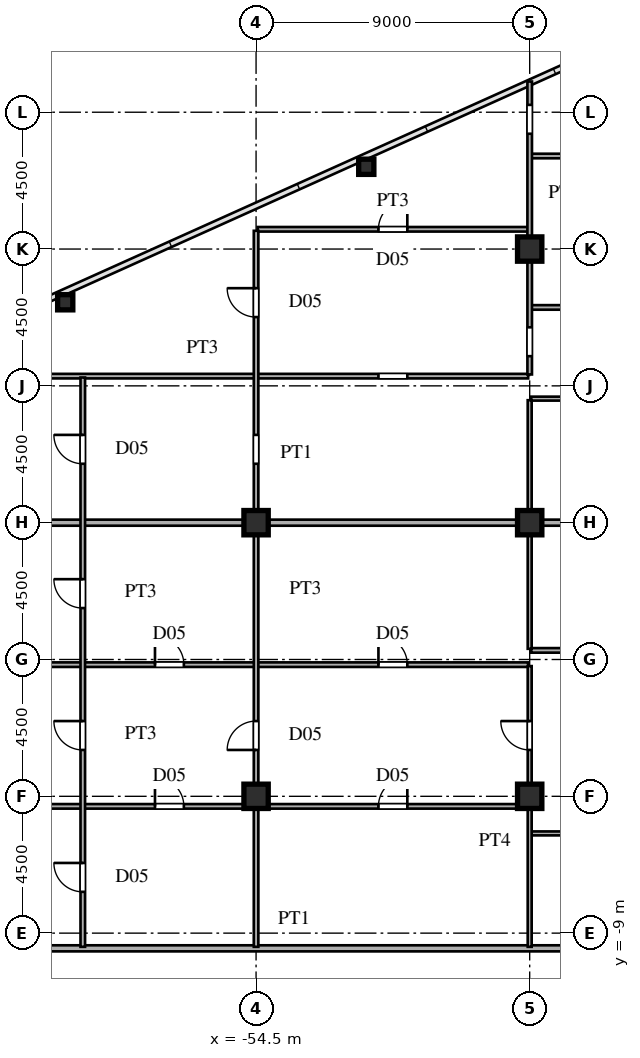
"""IFC4 building model, lengths in metres.
Left out: names, types, materials, properties, quantities, classifications, styles, units other than length and angle.
Written with IfcOpenShell. Run it as: python <this file> out.ifc"""

import sys

from ifc_helpers import new_model, si_unit, direction, frame, frame_2d, origin, origin_2d, place, context, subcontext, project, spatial, rectangle, hollow_rectangle, i_section, extrude, source, transform, mapped, element, fill, save


model = new_model("IFC4")
c1 = context("Model", 3, precision=1e-05, world=origin(), true_north=direction((0.0, 1.0)))
c2 = subcontext(c1, "Body", "Model", "MODEL_VIEW")
j1 = project(units=[si_unit("LENGTHUNIT", "METRE"), si_unit("PLANEANGLEUNIT", "RADIAN")], contexts=[c1])
p1 = place(None, origin())
s1 = spatial("IfcSite", under=j1, at=p1, CompositionType="ELEMENT")
p2 = place(p1, origin())
s2 = spatial("IfcBuilding", under=s1, at=p2, CompositionType="ELEMENT")
p3 = place(p2, frame((0.0, 0.0, 80.1)))
s3 = spatial("IfcBuildingStorey", under=s2, at=p3, CompositionType="ELEMENT", Elevation=80.1)
m1 = source(origin(), c2, "Body", "SweptSolid", [
    extrude(i_section(OverallWidth=0.8, OverallDepth=0.8, WebThickness=0.032, FlangeThickness=0.05, at=origin_2d()), origin(), (0.0, 0.0, 1.0), 3.6),
])
for number, where, z_axis, x_axis in (
    (1, (-45.5, -4.5, 0.0), (0.0, 0.0, 1.0), (1.0, 0.0, 0.0)),
    (2, (-45.5, 4.5, 0.0), (0.0, 0.0, 1.0), (1.0, 0.0, 0.0)),
    (3, (-45.5, 13.5, 0.0), (0.0, 0.0, 1.0), (1.0, 0.0, 0.0)),
    (4, (-54.5, -4.5, 0.0), (0.0, 0.0, 1.0), (1.0, 0.0, 0.0)),
    (5, (-54.5, 4.5, 0.0), (0.0, 0.0, 1.0), (1.0, 0.0, 0.0)),
):
    element("IfcColumn", number, at=place(p3, frame(where, z_axis=z_axis, x_axis=x_axis)), inside=s3, PredefinedType="COLUMN", context=c2, shape_type="MappedRepresentation", body=[
        mapped(m1, transform((0.0, 0.0, 0.0), scale=1.0)),
    ])
m2 = source(origin(), c2, "Body", "SweptSolid", [
    extrude(hollow_rectangle(XDim=0.5, YDim=0.5, WallThickness=0.02, at=origin_2d()), origin(), (0.0, 0.0, 1.0), 3.6),
])
for number, where, z_axis, x_axis in (
    (6, (-50.875, 16.205, 0.0), (0.0, 0.0, 1.0), (1.0, 0.0, 0.0)),
    (7, (-60.778, 11.749, 0.0), (0.0, 0.0, 1.0), (1.0, 0.0, 0.0)),
):
    element("IfcColumn", number, at=place(p3, frame(where, z_axis=z_axis, x_axis=x_axis)), inside=s3, PredefinedType="COLUMN", context=c2, shape_type="MappedRepresentation", body=[
        mapped(m2, transform((0.0, 0.0, 0.0), scale=1.0)),
    ])
p4 = place(p3, frame((-66.568, -9.5, 0.0), z_axis=(0.0, 0.0, 1.0), x_axis=(1.0, 0.0, 0.0)))
e8 = element("IfcWall", 8, at=p4, inside=s3, PredefinedType="PARTITIONING", context=c2, shape_type="SweptSolid", body=[
    extrude(rectangle(XDim=26.638, YDim=0.2, at=frame_2d((13.319, 0.0))), origin(), (0.0, 0.0, 1.0), 3.38),
])
p5 = place(p3, frame((-45.45, -5.72, 0.0), z_axis=(0.0, 0.0, 1.0), x_axis=(1.0, 0.0, 0.0)))
e9 = element("IfcWall", 9, at=p5, inside=s3, PredefinedType="PARTITIONING", context=c2, shape_type="SweptSolid", body=[
    extrude(rectangle(XDim=5.55, YDim=0.13, at=frame_2d((2.775, 0.0))), origin(), (0.0, 0.0, 1.0), 3.38),
])
p6 = place(p5, frame((2.335, 0.0, 0.0)))
e10 = element("IfcOpeningElement", 10, at=p6, cuts=e9, PredefinedType="OPENING", context=c2, shape_type="SweptSolid", body=[
    extrude(rectangle(XDim=0.88, YDim=2.1, at=frame_2d((0.44, 1.05))), frame((0.0, 0.075, 0.0), z_axis=(0.0, -1.0, 0.0), x_axis=(1.0, 0.0, 0.0)), (0.0, 0.0, 1.0), 0.15),
])
p7 = place(p3, frame((-71.035, -4.83, 0.0), z_axis=(0.0, 0.0, 1.0), x_axis=(1.0, 0.0, 0.0)))
e11 = element("IfcWall", 11, at=p7, inside=s3, PredefinedType="PARTITIONING", context=c2, shape_type="SweptSolid", body=[
    extrude(rectangle(XDim=25.485, YDim=0.15, at=frame_2d((12.742, 0.0))), origin(), (0.0, 0.0, 1.0), 3.38),
])
p8 = place(p7, frame((20.56, 0.0, 0.0)))
e12 = element("IfcOpeningElement", 12, at=p8, cuts=e11, PredefinedType="OPENING", context=c2, shape_type="SweptSolid", body=[
    extrude(rectangle(XDim=0.95, YDim=2.15, at=frame_2d((0.475, 1.075))), frame((0.0, 0.085, 0.0), z_axis=(0.0, -1.0, 0.0), x_axis=(1.0, 0.0, 0.0)), (0.0, 0.0, 1.0), 0.17),
])
p9 = place(p7, frame((13.21, 0.0, 0.0)))
e13 = element("IfcOpeningElement", 13, at=p9, cuts=e11, PredefinedType="OPENING", context=c2, shape_type="SweptSolid", body=[
    extrude(rectangle(XDim=0.95, YDim=2.15, at=frame_2d((0.475, 1.075))), frame((0.0, 0.085, 0.0), z_axis=(0.0, -1.0, 0.0), x_axis=(1.0, 0.0, 0.0)), (0.0, 0.0, 1.0), 0.17),
])
p10 = place(p3, frame((-71.035, -0.17, 0.0), z_axis=(0.0, 0.0, 1.0), x_axis=(1.0, 0.0, 0.0)))
e14 = element("IfcWall", 14, at=p10, inside=s3, PredefinedType="PARTITIONING", context=c2, shape_type="SweptSolid", body=[
    extrude(rectangle(XDim=25.485, YDim=0.15, at=frame_2d((12.742, 0.0))), origin(), (0.0, 0.0, 1.0), 3.38),
])
p11 = place(p10, frame((20.56, 0.0, 0.0)))
e15 = element("IfcOpeningElement", 15, at=p11, cuts=e14, PredefinedType="OPENING", context=c2, shape_type="SweptSolid", body=[
    extrude(rectangle(XDim=0.95, YDim=2.15, at=frame_2d((0.475, 1.075))), frame((0.0, 0.085, 0.0), z_axis=(0.0, -1.0, 0.0), x_axis=(1.0, 0.0, 0.0)), (0.0, 0.0, 1.0), 0.17),
])
p12 = place(p10, frame((13.21, 0.0, 0.0)))
e16 = element("IfcOpeningElement", 16, at=p12, cuts=e14, PredefinedType="OPENING", context=c2, shape_type="SweptSolid", body=[
    extrude(rectangle(XDim=0.95, YDim=2.15, at=frame_2d((0.475, 1.075))), frame((0.0, 0.085, 0.0), z_axis=(0.0, -1.0, 0.0), x_axis=(1.0, 0.0, 0.0)), (0.0, 0.0, 1.0), 0.17),
])
p13 = place(p3, frame((-45.45, 0.3, 0.0), z_axis=(0.0, 0.0, 1.0), x_axis=(1.0, 0.0, 0.0)))
e17 = element("IfcWall", 17, at=p13, inside=s3, PredefinedType="PARTITIONING", context=c2, shape_type="SweptSolid", body=[
    extrude(rectangle(XDim=5.55, YDim=0.15, at=frame_2d((2.775, 0.0))), origin(), (0.0, 0.0, 1.0), 3.38),
])
p14 = place(p13, frame((2.3, 0.0, 0.0)))
e18 = element("IfcOpeningElement", 18, at=p14, cuts=e17, PredefinedType="OPENING", context=c2, shape_type="SweptSolid", body=[
    extrude(rectangle(XDim=0.95, YDim=2.15, at=frame_2d((0.475, 1.075))), frame((0.0, 0.085, 0.0), z_axis=(0.0, -1.0, 0.0), x_axis=(1.0, 0.0, 0.0)), (0.0, 0.0, 1.0), 0.17),
])
p15 = place(p3, frame((-71.005, 4.5, 0.0), z_axis=(0.0, 0.0, 1.0), x_axis=(1.0, 0.0, 0.0)))
e19 = element("IfcWall", 19, at=p15, inside=s3, PredefinedType="PARTITIONING", context=c2, shape_type="SweptSolid", body=[
    extrude(rectangle(XDim=16.485, YDim=0.2, at=frame_2d((8.242, 0.0))), origin(), (0.0, 0.0, 1.0), 3.38),
])
p16 = place(p3, frame((-54.52, 4.5, 0.0), z_axis=(0.0, 0.0, 1.0), x_axis=(1.0, 0.0, 0.0)))
e20 = element("IfcWall", 20, at=p16, inside=s3, PredefinedType="PARTITIONING", context=c2, shape_type="SweptSolid", body=[
    extrude(rectangle(XDim=14.59, YDim=0.2, at=frame_2d((7.295, 0.0))), origin(), (0.0, 0.0, 1.0), 2.68),
])
p17 = place(p3, frame((-45.45, 8.58, 0.0), z_axis=(0.0, 0.0, 1.0), x_axis=(1.0, 0.0, 0.0)))
e21 = element("IfcWall", 21, at=p17, inside=s3, PredefinedType="PARTITIONING", context=c2, shape_type="SweptSolid", body=[
    extrude(rectangle(XDim=5.55, YDim=0.13, at=frame_2d((2.775, 0.0))), origin(), (0.0, 0.0, 1.0), 3.38),
])
p18 = place(p17, frame((2.335, 0.0, 0.0)))
e22 = element("IfcOpeningElement", 22, at=p18, cuts=e21, PredefinedType="OPENING", context=c2, shape_type="SweptSolid", body=[
    extrude(rectangle(XDim=0.88, YDim=2.1, at=frame_2d((0.44, 1.05))), frame((0.0, 0.075, 0.0), z_axis=(0.0, -1.0, 0.0), x_axis=(1.0, 0.0, 0.0)), (0.0, 0.0, 1.0), 0.15),
])
p19 = place(p3, frame((-66.979, 9.32, 0.0), z_axis=(0.0, 0.0, 1.0), x_axis=(1.0, 0.0, 0.0)))
e23 = element("IfcWall", 23, at=p19, inside=s3, PredefinedType="PARTITIONING", context=c2, shape_type="SweptSolid", body=[
    extrude(rectangle(XDim=21.429, YDim=0.15, at=frame_2d((10.714, 0.0))), origin(), (0.0, 0.0, 1.0), 3.38),
])
p20 = place(p19, frame((16.504, 0.0, 0.0)))
e24 = element("IfcOpeningElement", 24, at=p20, cuts=e23, PredefinedType="OPENING", context=c2, shape_type="SweptSolid", body=[
    extrude(rectangle(XDim=0.95, YDim=2.15, at=frame_2d((0.475, 1.075))), frame((0.0, 0.085, 0.0), z_axis=(0.0, -1.0, 0.0), x_axis=(1.0, 0.0, 0.0)), (0.0, 0.0, 1.0), 0.17),
])
p21 = place(p3, frame((-45.45, 11.58, 0.0), z_axis=(0.0, 0.0, 1.0), x_axis=(1.0, 0.0, 0.0)))
e25 = element("IfcWall", 25, at=p21, inside=s3, PredefinedType="PARTITIONING", context=c2, shape_type="SweptSolid", body=[
    extrude(rectangle(XDim=5.55, YDim=0.15, at=frame_2d((2.775, 0.0))), origin(), (0.0, 0.0, 1.0), 3.38),
])
p22 = place(p21, frame((2.3, 0.0, 0.0)))
e26 = element("IfcOpeningElement", 26, at=p22, cuts=e25, PredefinedType="OPENING", context=c2, shape_type="SweptSolid", body=[
    extrude(rectangle(XDim=0.95, YDim=2.15, at=frame_2d((0.475, 1.075))), frame((0.0, 0.085, 0.0), z_axis=(0.0, -1.0, 0.0), x_axis=(1.0, 0.0, 0.0)), (0.0, 0.0, 1.0), 0.17),
])
p23 = place(p3, frame((-54.45, 14.15, 0.0), z_axis=(0.0, 0.0, 1.0), x_axis=(1.0, 0.0, 0.0)))
e27 = element("IfcWall", 27, at=p23, inside=s3, PredefinedType="PARTITIONING", context=c2, shape_type="SweptSolid", body=[
    extrude(rectangle(XDim=8.9, YDim=0.15, at=frame_2d((4.45, 0.0))), origin(), (0.0, 0.0, 1.0), 3.38),
])
p24 = place(p23, frame((3.975, 0.0, 0.0)))
e28 = element("IfcOpeningElement", 28, at=p24, cuts=e27, PredefinedType="OPENING", context=c2, shape_type="SweptSolid", body=[
    extrude(rectangle(XDim=0.95, YDim=2.15, at=frame_2d((0.475, 1.075))), frame((0.0, 0.085, 0.0), z_axis=(0.0, -1.0, 0.0), x_axis=(1.0, 0.0, 0.0)), (0.0, 0.0, 1.0), 0.17),
])
p25 = place(p3, frame((-45.45, 16.56, 0.0), z_axis=(0.0, 0.0, 1.0), x_axis=(1.0, 0.0, 0.0)))
e29 = element("IfcWall", 29, at=p25, inside=s3, PredefinedType="PARTITIONING", context=c2, shape_type="SweptSolid", body=[
    extrude(rectangle(XDim=5.6, YDim=0.15, at=frame_2d((2.8, 0.0))), origin(), (0.0, 0.0, 1.0), 3.38),
])
p26 = place(p3, frame((-60.2, -9.45, 0.0), z_axis=(0.0, 0.0, 1.0), x_axis=(0.0, 1.0, 0.0)))
e30 = element("IfcWall", 30, at=p26, inside=s3, PredefinedType="PARTITIONING", context=c2, shape_type="SweptSolid", body=[
    extrude(rectangle(XDim=18.725, YDim=0.15, at=frame_2d((9.362, 0.0))), origin(), (0.0, 0.0, 1.0), 3.38),
])
p27 = place(p26, frame((1.808, 0.0, 0.0)))
e31 = element("IfcOpeningElement", 31, at=p27, cuts=e30, PredefinedType="OPENING", context=c2, shape_type="SweptSolid", body=[
    extrude(rectangle(XDim=0.95, YDim=2.15, at=frame_2d((0.475, 1.075))), frame((0.0, 0.085, 0.0), z_axis=(0.0, -1.0, 0.0), x_axis=(1.0, 0.0, 0.0)), (0.0, 0.0, 1.0), 0.17),
])
p28 = place(p26, frame((6.475, 0.0, 0.0)))
e32 = element("IfcOpeningElement", 32, at=p28, cuts=e30, PredefinedType="OPENING", context=c2, shape_type="SweptSolid", body=[
    extrude(rectangle(XDim=0.95, YDim=2.15, at=frame_2d((0.475, 1.075))), frame((0.0, 0.085, 0.0), z_axis=(0.0, -1.0, 0.0), x_axis=(1.0, 0.0, 0.0)), (0.0, 0.0, 1.0), 0.17),
])
p29 = place(p26, frame((11.142, 0.0, 0.0)))
e33 = element("IfcOpeningElement", 33, at=p29, cuts=e30, PredefinedType="OPENING", context=c2, shape_type="SweptSolid", body=[
    extrude(rectangle(XDim=0.95, YDim=2.15, at=frame_2d((0.475, 1.075))), frame((0.0, 0.085, 0.0), z_axis=(0.0, -1.0, 0.0), x_axis=(1.0, 0.0, 0.0)), (0.0, 0.0, 1.0), 0.17),
])
p30 = place(p26, frame((15.887, 0.0, 0.0)))
e34 = element("IfcOpeningElement", 34, at=p30, cuts=e30, PredefinedType="OPENING", context=c2, shape_type="SweptSolid", body=[
    extrude(rectangle(XDim=0.95, YDim=2.15, at=frame_2d((0.475, 1.075))), frame((0.0, 0.085, 0.0), z_axis=(0.0, -1.0, 0.0), x_axis=(1.0, 0.0, 0.0)), (0.0, 0.0, 1.0), 0.17),
])
p31 = place(p3, frame((-54.5, -9.45, 0.0), z_axis=(0.0, 0.0, 1.0), x_axis=(0.0, 1.0, 0.0)))
e35 = element("IfcWall", 35, at=p31, inside=s3, PredefinedType="PARTITIONING", context=c2, shape_type="SweptSolid", body=[
    extrude(rectangle(XDim=23.55, YDim=0.15, at=frame_2d((11.775, 0.0))), origin(), (0.0, 0.0, 1.0), 2.68),
])
p32 = place(p31, frame((6.475, 0.0, 0.0)))
e36 = element("IfcOpeningElement", 36, at=p32, cuts=e35, PredefinedType="OPENING", context=c2, shape_type="SweptSolid", body=[
    extrude(rectangle(XDim=0.95, YDim=2.15, at=frame_2d((0.475, 1.075))), frame((0.0, 0.085, 0.0), z_axis=(0.0, -1.0, 0.0), x_axis=(1.0, 0.0, 0.0)), (0.0, 0.0, 1.0), 0.17),
])
p33 = place(p31, frame((20.712, 0.0, 0.0)))
e37 = element("IfcOpeningElement", 37, at=p33, cuts=e35, PredefinedType="OPENING", context=c2, shape_type="SweptSolid", body=[
    extrude(rectangle(XDim=0.95, YDim=2.15, at=frame_2d((0.475, 1.075))), frame((0.0, 0.085, 0.0), z_axis=(0.0, -1.0, 0.0), x_axis=(1.0, 0.0, 0.0)), (0.0, 0.0, 1.0), 0.17),
])
p34 = place(p31, frame((15.887, 0.0, 0.0)))
e38 = element("IfcOpeningElement", 38, at=p34, cuts=e35, PredefinedType="OPENING", context=c2, shape_type="SweptSolid", body=[
    extrude(rectangle(XDim=0.95, YDim=2.15, at=frame_2d((0.475, 1.075))), frame((0.0, 0.085, 0.0), z_axis=(0.0, -1.0, 0.0), x_axis=(1.0, 0.0, 0.0)), (0.0, 0.0, 1.0), 0.17),
])
p35 = place(p3, frame((-45.5, -9.45, 0.0), z_axis=(0.0, 0.0, 1.0), x_axis=(0.0, 1.0, 0.0)))
e39 = element("IfcWall", 39, at=p35, inside=s3, PredefinedType="PARTITIONING", context=c2, shape_type="SweptSolid", body=[
    extrude(rectangle(XDim=9.233, YDim=0.13, at=frame_2d((4.616, 0.0))), origin(), (0.0, 0.0, 1.0), 2.68),
])
p36 = place(p35, frame((6.475, 0.0, 0.0)))
e40 = element("IfcOpeningElement", 40, at=p36, cuts=e39, PredefinedType="OPENING", context=c2, shape_type="SweptSolid", body=[
    extrude(rectangle(XDim=0.95, YDim=2.15, at=frame_2d((0.475, 1.075))), frame((0.0, 0.075, 0.0), z_axis=(0.0, -1.0, 0.0), x_axis=(1.0, 0.0, 0.0)), (0.0, 0.0, 1.0), 0.15),
])
p37 = place(p3, frame((-45.5, 0.352, 0.0), z_axis=(0.0, 0.0, 1.0), x_axis=(0.0, 1.0, 0.0)))
e41 = element("IfcWall", 41, at=p37, inside=s3, PredefinedType="PARTITIONING", context=c2, shape_type="SweptSolid", body=[
    extrude(rectangle(XDim=8.176, YDim=0.13, at=frame_2d((4.088, 0.0))), origin(), (0.0, 0.0, 1.0), 2.68),
])
p38 = place(p3, frame((-45.5, 9.375, 0.0), z_axis=(0.0, 0.0, 1.0), x_axis=(0.0, 1.0, 0.0)))
e42 = element("IfcWall", 42, at=p38, inside=s3, PredefinedType="PARTITIONING", context=c2, shape_type="SweptSolid", body=[
    extrude(rectangle(XDim=9.635, YDim=0.15, at=frame_2d((4.817, 0.0))), origin(), (0.0, 0.0, 1.0), 2.68),
])
p39 = place(p38, frame((0.601, 0.0, 0.0)))
e43 = element("IfcOpeningElement", 43, at=p39, cuts=e42, PredefinedType="OPENING", context=c2, shape_type="SweptSolid", body=[
    extrude(rectangle(XDim=0.95, YDim=2.15, at=frame_2d((0.475, 1.075))), frame((0.0, 0.085, 0.0), z_axis=(0.0, -1.0, 0.0), x_axis=(1.0, 0.0, 0.0)), (0.0, 0.0, 1.0), 0.17),
])
p40 = place(p38, frame((7.917, 0.0, 0.0)))
e44 = element("IfcOpeningElement", 44, at=p40, cuts=e42, PredefinedType="OPENING", context=c2, shape_type="SweptSolid", body=[
    extrude(rectangle(XDim=0.95, YDim=2.15, at=frame_2d((0.475, 1.075))), frame((0.0, 0.085, 0.0), z_axis=(0.0, -1.0, 0.0), x_axis=(1.0, 0.0, 0.0)), (0.0, 0.0, 1.0), 0.17),
])
m3 = source(origin(), c2, "Body", "SweptSolid", [
    extrude(rectangle(XDim=0.95, YDim=2.15, at=frame_2d((0.475, 1.075))), frame((0.0, 0.025, 0.0), z_axis=(0.0, -1.0, 0.0), x_axis=(1.0, 0.0, 0.0)), (0.0, 0.0, 1.0), 0.05),
])
p41 = place(p8, origin())
e45 = element("IfcDoor", 45, at=p41, inside=s3, OperationType="SINGLE_SWING_RIGHT", PredefinedType="DOOR", context=c2, shape_type="MappedRepresentation", body=[
    mapped(m3, transform((0.0, 0.0, 0.0), scale=1.0)),
])
fill(e12, e45)
p42 = place(p9, origin())
e46 = element("IfcDoor", 46, at=p42, inside=s3, OperationType="SINGLE_SWING_LEFT", PredefinedType="DOOR", context=c2, shape_type="MappedRepresentation", body=[
    mapped(m3, transform((0.0, 0.0, 0.0), scale=1.0)),
])
fill(e13, e46)
p43 = place(p11, origin())
e47 = element("IfcDoor", 47, at=p43, inside=s3, OperationType="SINGLE_SWING_LEFT", PredefinedType="DOOR", context=c2, shape_type="MappedRepresentation", body=[
    mapped(m3, transform((0.0, 0.0, 0.0), scale=1.0)),
])
fill(e15, e47)
p44 = place(p12, origin())
e48 = element("IfcDoor", 48, at=p44, inside=s3, OperationType="SINGLE_SWING_LEFT", PredefinedType="DOOR", context=c2, shape_type="MappedRepresentation", body=[
    mapped(m3, transform((0.0, 0.0, 0.0), scale=1.0)),
])
fill(e16, e48)
p45 = place(p24, origin())
e49 = element("IfcDoor", 49, at=p45, inside=s3, OperationType="SINGLE_SWING_RIGHT", PredefinedType="DOOR", context=c2, shape_type="MappedRepresentation", body=[
    mapped(m3, transform((0.0, 0.0, 0.0), scale=1.0)),
])
fill(e28, e49)
p46 = place(p27, origin())
e50 = element("IfcDoor", 50, at=p46, inside=s3, OperationType="SINGLE_SWING_RIGHT", PredefinedType="DOOR", context=c2, shape_type="MappedRepresentation", body=[
    mapped(m3, transform((0.0, 0.0, 0.0), scale=1.0)),
])
fill(e31, e50)
p47 = place(p28, origin())
e51 = element("IfcDoor", 51, at=p47, inside=s3, OperationType="SINGLE_SWING_RIGHT", PredefinedType="DOOR", context=c2, shape_type="MappedRepresentation", body=[
    mapped(m3, transform((0.0, 0.0, 0.0), scale=1.0)),
])
fill(e32, e51)
p48 = place(p29, origin())
e52 = element("IfcDoor", 52, at=p48, inside=s3, OperationType="SINGLE_SWING_RIGHT", PredefinedType="DOOR", context=c2, shape_type="MappedRepresentation", body=[
    mapped(m3, transform((0.0, 0.0, 0.0), scale=1.0)),
])
fill(e33, e52)
p49 = place(p30, origin())
e53 = element("IfcDoor", 53, at=p49, inside=s3, OperationType="SINGLE_SWING_RIGHT", PredefinedType="DOOR", context=c2, shape_type="MappedRepresentation", body=[
    mapped(m3, transform((0.0, 0.0, 0.0), scale=1.0)),
])
fill(e34, e53)
p50 = place(p32, origin())
e54 = element("IfcDoor", 54, at=p50, inside=s3, OperationType="SINGLE_SWING_LEFT", PredefinedType="DOOR", context=c2, shape_type="MappedRepresentation", body=[
    mapped(m3, transform((0.0, 0.0, 0.0), scale=1.0)),
])
fill(e36, e54)
p51 = place(p33, origin())
e55 = element("IfcDoor", 55, at=p51, inside=s3, OperationType="SINGLE_SWING_RIGHT", PredefinedType="DOOR", context=c2, shape_type="MappedRepresentation", body=[
    mapped(m3, transform((0.0, 0.0, 0.0), scale=1.0)),
])
fill(e37, e55)
p52 = place(p36, origin())
e56 = element("IfcDoor", 56, at=p52, inside=s3, OperationType="SINGLE_SWING_RIGHT", PredefinedType="DOOR", context=c2, shape_type="MappedRepresentation", body=[
    mapped(m3, transform((0.0, 0.0, 0.0), scale=1.0)),
])
fill(e40, e56)
save(model, sys.argv[1])
